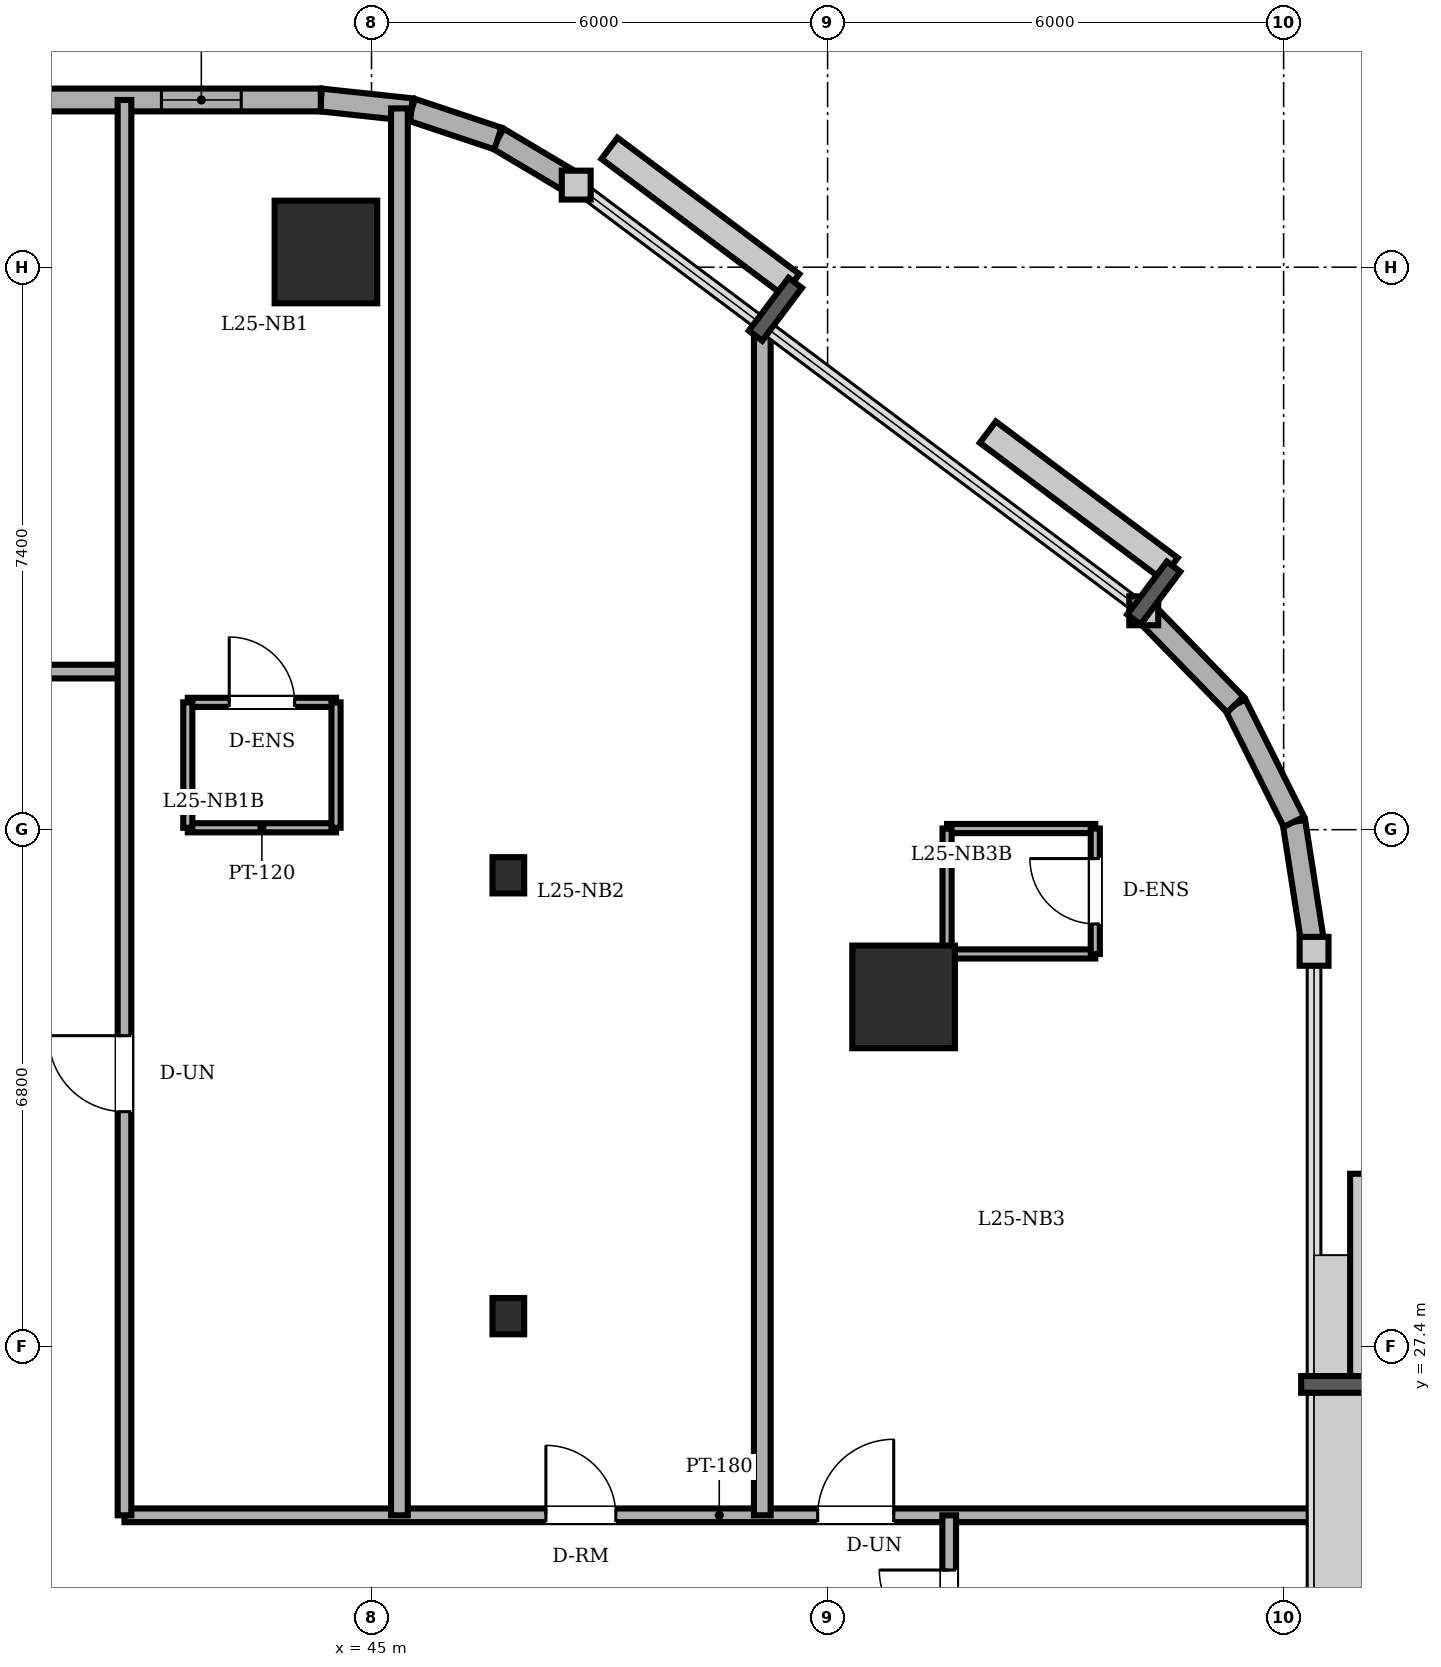
"""IFC4 building model, lengths in metres.
Left out: names, types, materials, properties, quantities, classifications, styles, units other than length and angle.
Written with IfcOpenShell. Run it as: python <this file> out.ifc"""

import sys

from ifc_helpers import new_model, si_unit, direction, frame, frame_2d, origin, origin_2d, place, context, subcontext, project, spatial, rectangle, circle, i_section, extrude, element, fill, save


model = new_model("IFC4")
c1 = context("Model", 3, precision=1e-05, world=origin(), true_north=direction((0.0, 1.0)))
c2 = subcontext(c1, "Body", "Model", "MODEL_VIEW")
j1 = project(units=[si_unit("LENGTHUNIT", "METRE"), si_unit("PLANEANGLEUNIT", "RADIAN")], contexts=[c1])
p1 = place(None, origin())
s1 = spatial("IfcSite", under=j1, at=p1, CompositionType="ELEMENT")
p2 = place(p1, origin())
s2 = spatial("IfcBuilding", under=s1, at=p2, CompositionType="ELEMENT")
p3 = place(p2, frame((0.0, 0.0, 97.1)))
s3 = spatial("IfcBuildingStorey", under=s2, at=p3, CompositionType="ELEMENT", Elevation=97.1)
for number, where, z_axis, x_axis in (
    (1, (52.0, 32.0, 0.0), (0.0, 0.0, 1.0), (1.0, 0.0, 0.0)),
    (2, (44.4, 41.8, 0.0), (0.0, 0.0, 1.0), (1.0, 0.0, 0.0)),
):
    element("IfcColumn", number, at=place(p3, frame(where, z_axis=z_axis, x_axis=x_axis)), inside=s3, PredefinedType="COLUMN", context=c2, shape_type="SweptSolid", body=[
        extrude(circle(Radius=0.675, at=origin_2d()), origin(), (0.0, 0.0, 1.0), 3.6),
    ])
for number, where, z_axis, x_axis in (
    (3, (46.8, 27.8, 0.0), (0.0, 0.0, 1.0), (1.0, 0.0, 0.0)),
    (4, (46.8, 33.6, 0.0), (0.0, 0.0, 1.0), (1.0, 0.0, 0.0)),
):
    element("IfcColumn", number, at=place(p3, frame(where, z_axis=z_axis, x_axis=x_axis)), inside=s3, PredefinedType="COLUMN", context=c2, shape_type="SweptSolid", body=[
        extrude(i_section(OverallWidth=0.417, OverallDepth=0.477, WebThickness=0.036, FlangeThickness=0.057, FilletRadius=0.015, at=origin_2d()), origin(), (0.0, 0.0, 1.0), 3.6),
    ])
p4 = place(p3, frame((57.4, 32.6, 0.0), z_axis=(0.0, 0.0, 1.0), x_axis=(-0.153620989032, 0.988129845581, 0.0)))
e5 = element("IfcWall", 5, at=p4, inside=s3, PredefinedType="SOLIDWALL", context=c2, shape_type="SweptSolid", body=[
    extrude(rectangle(XDim=1.724, YDim=0.3, at=frame_2d((0.862, 0.0))), origin(), (0.0, 0.0, 1.0), 3.4),
])
for number, where, z_axis, x_axis in (
    (6, (57.135, 34.304, 0.0), (0.0, 0.0, 1.0), (-0.447, 0.894, 0.0)),
    (7, (56.364, 35.846, 0.0), (0.0, 0.0, 1.0), (-0.698, 0.716, 0.0)),
):
    element("IfcWall", number, at=place(p3, frame(where, z_axis=z_axis, x_axis=x_axis)), inside=s3, PredefinedType="SOLIDWALL", context=c2, shape_type="SweptSolid", body=[
        extrude(rectangle(XDim=1.724, YDim=0.3, at=frame_2d((0.862, 0.0))), origin(), (0.0, 0.0, 1.0), 3.4),
    ])
p5 = place(p3, frame((47.693, 42.68, 0.0), z_axis=(0.0, 0.0, 1.0), x_axis=(-0.859320591642, 0.511437308749, 0.0)))
e8 = element("IfcWall", 8, at=p5, inside=s3, PredefinedType="SOLIDWALL", context=c2, shape_type="SweptSolid", body=[
    extrude(rectangle(XDim=1.199, YDim=0.3, at=frame_2d((0.599, 0.0))), origin(), (0.0, 0.0, 1.0), 3.4),
])
p6 = place(p3, frame((46.663, 43.293, 0.0), z_axis=(0.0, 0.0, 1.0), x_axis=(-0.948744332129, 0.316044604847, 0.0)))
e9 = element("IfcWall", 9, at=p6, inside=s3, PredefinedType="SOLIDWALL", context=c2, shape_type="SweptSolid", body=[
    extrude(rectangle(XDim=1.2, YDim=0.3, at=frame_2d((0.6, 0.0))), origin(), (0.0, 0.0, 1.0), 3.4),
])
p7 = place(p3, frame((45.525, 43.672, 0.0), z_axis=(0.0, 0.0, 1.0), x_axis=(-0.994289103787, 0.106720092254, 0.0)))
e10 = element("IfcWall", 10, at=p7, inside=s3, PredefinedType="SOLIDWALL", context=c2, shape_type="SweptSolid", body=[
    extrude(rectangle(XDim=1.199, YDim=0.3, at=frame_2d((0.599, 0.0))), origin(), (0.0, 0.0, 1.0), 3.4),
])
p8 = place(p3, frame((44.333, 43.8, 0.0), z_axis=(0.0, 0.0, 1.0), x_axis=(-1.0, 0.0, 0.0)))
e11 = element("IfcWall", 11, at=p8, inside=s3, PredefinedType="SOLIDWALL", context=c2, shape_type="SweptSolid", body=[
    extrude(rectangle(XDim=29.933, YDim=0.3, at=frame_2d((14.967, 0.0))), origin(), (0.0, 0.0, 1.0), 3.4),
])
p9 = place(p8, frame((18.883, 0.0, 0.0)))
e12 = element("IfcOpeningElement", 12, at=p9, cuts=e11, PredefinedType="OPENING", context=c2, shape_type="SweptSolid", body=[
    extrude(rectangle(XDim=0.95, YDim=2.2, at=frame_2d((0.475, 1.1))), frame((0.0, 0.16, 0.0), z_axis=(0.0, -1.0, 0.0), x_axis=(1.0, 0.0, 0.0)), (0.0, 0.0, 1.0), 0.32),
])
p10 = place(p8, frame((5.541, 0.0, 0.85)))
e13 = element("IfcOpeningElement", 13, at=p10, cuts=e11, PredefinedType="OPENING", context=c2, shape_type="SweptSolid", body=[
    extrude(rectangle(XDim=1.65, YDim=1.55, at=frame_2d((0.825, 0.775))), frame((0.0, 0.16, 0.0), z_axis=(0.0, -1.0, 0.0), x_axis=(1.0, 0.0, 0.0)), (0.0, 0.0, 1.0), 0.32),
])
p11 = place(p8, frame((9.325, 0.0, 0.85)))
e14 = element("IfcOpeningElement", 14, at=p11, cuts=e11, PredefinedType="OPENING", context=c2, shape_type="SweptSolid", body=[
    extrude(rectangle(XDim=1.65, YDim=1.55, at=frame_2d((0.825, 0.775))), frame((0.0, 0.16, 0.0), z_axis=(0.0, -1.0, 0.0), x_axis=(1.0, 0.0, 0.0)), (0.0, 0.0, 1.0), 0.32),
])
p12 = place(p8, frame((15.508, 0.0, 0.85)))
e15 = element("IfcOpeningElement", 15, at=p12, cuts=e11, PredefinedType="OPENING", context=c2, shape_type="SweptSolid", body=[
    extrude(rectangle(XDim=1.65, YDim=1.55, at=frame_2d((0.825, 0.775))), frame((0.0, 0.16, 0.0), z_axis=(0.0, -1.0, 0.0), x_axis=(1.0, 0.0, 0.0)), (0.0, 0.0, 1.0), 0.32),
])
p13 = place(p8, frame((23.125, 0.0, 0.85)))
e16 = element("IfcOpeningElement", 16, at=p13, cuts=e11, PredefinedType="OPENING", context=c2, shape_type="SweptSolid", body=[
    extrude(rectangle(XDim=1.65, YDim=1.55, at=frame_2d((0.825, 0.775))), frame((0.0, 0.16, 0.0), z_axis=(0.0, -1.0, 0.0), x_axis=(1.0, 0.0, 0.0)), (0.0, 0.0, 1.0), 0.32),
])
p14 = place(p8, frame((25.941, 0.0, 0.85)))
e17 = element("IfcOpeningElement", 17, at=p14, cuts=e11, PredefinedType="OPENING", context=c2, shape_type="SweptSolid", body=[
    extrude(rectangle(XDim=1.65, YDim=1.55, at=frame_2d((0.825, 0.775))), frame((0.0, 0.16, 0.0), z_axis=(0.0, -1.0, 0.0), x_axis=(1.0, 0.0, 0.0)), (0.0, 0.0, 1.0), 0.32),
])
p15 = place(p8, frame((1.047, 0.0, 0.85)))
e18 = element("IfcOpeningElement", 18, at=p15, cuts=e11, PredefinedType="OPENING", context=c2, shape_type="SweptSolid", body=[
    extrude(rectangle(XDim=1.05, YDim=1.55, at=frame_2d((0.525, 0.775))), frame((0.0, 0.16, 0.0), z_axis=(0.0, -1.0, 0.0), x_axis=(1.0, 0.0, 0.0)), (0.0, 0.0, 1.0), 0.32),
])
p16 = place(p3, frame((42.583, 35.875, 0.0), z_axis=(0.0, 0.0, 1.0), x_axis=(1.0, 0.0, 0.0)))
e19 = element("IfcWall", 19, at=p16, inside=s3, PredefinedType="PARTITIONING", context=c2, shape_type="SweptSolid", body=[
    extrude(rectangle(XDim=1.95, YDim=0.12, at=frame_2d((0.975, 0.0))), origin(), (0.0, 0.0, 1.0), 3.4),
])
p17 = place(p16, frame((0.545, 0.0, 0.0)))
e20 = element("IfcOpeningElement", 20, at=p17, cuts=e19, PredefinedType="OPENING", context=c2, shape_type="SweptSolid", body=[
    extrude(rectangle(XDim=0.86, YDim=2.1, at=frame_2d((0.43, 1.05))), frame((0.0, 0.07, 0.0), z_axis=(0.0, -1.0, 0.0), x_axis=(1.0, 0.0, 0.0)), (0.0, 0.0, 1.0), 0.14),
])
p18 = place(p3, frame((44.533, 34.225, 0.0), z_axis=(0.0, 0.0, 1.0), x_axis=(-1.0, 0.0, 0.0)))
e21 = element("IfcWall", 21, at=p18, inside=s3, PredefinedType="PARTITIONING", context=c2, shape_type="SweptSolid", body=[
    extrude(rectangle(XDim=1.95, YDim=0.12, at=frame_2d((0.975, 0.0))), origin(), (0.0, 0.0, 1.0), 3.4),
])
for number, where, z_axis, x_axis in (
    (22, (42.583, 35.875, 0.0), (0.0, 0.0, 1.0), (0.0, -1.0, 0.0)),
    (23, (44.533, 34.225, 0.0), (0.0, 0.0, 1.0), (0.0, 1.0, 0.0)),
):
    element("IfcWall", number, at=place(p3, frame(where, z_axis=z_axis, x_axis=x_axis)), inside=s3, PredefinedType="PARTITIONING", context=c2, shape_type="SweptSolid", body=[
        extrude(rectangle(XDim=1.65, YDim=0.12, at=frame_2d((0.825, 0.0))), origin(), (0.0, 0.0, 1.0), 3.4),
    ])
for number, where, z_axis, x_axis in (
    (24, (52.572, 34.215, 0.0), (0.0, 0.0, 1.0), (1.0, 0.0, 0.0)),
    (25, (54.522, 32.565, 0.0), (0.0, 0.0, 1.0), (-1.0, 0.0, 0.0)),
):
    element("IfcWall", number, at=place(p3, frame(where, z_axis=z_axis, x_axis=x_axis)), inside=s3, PredefinedType="PARTITIONING", context=c2, shape_type="SweptSolid", body=[
        extrude(rectangle(XDim=1.95, YDim=0.12, at=frame_2d((0.975, 0.0))), origin(), (0.0, 0.0, 1.0), 3.4),
    ])
p19 = place(p3, frame((52.572, 34.215, 0.0), z_axis=(0.0, 0.0, 1.0), x_axis=(0.0, -1.0, 0.0)))
e26 = element("IfcWall", 26, at=p19, inside=s3, PredefinedType="PARTITIONING", context=c2, shape_type="SweptSolid", body=[
    extrude(rectangle(XDim=1.65, YDim=0.12, at=frame_2d((0.825, 0.0))), origin(), (0.0, 0.0, 1.0), 3.4),
])
p20 = place(p3, frame((54.522, 32.565, 0.0), z_axis=(0.0, 0.0, 1.0), x_axis=(0.0, 1.0, 0.0)))
e27 = element("IfcWall", 27, at=p20, inside=s3, PredefinedType="PARTITIONING", context=c2, shape_type="SweptSolid", body=[
    extrude(rectangle(XDim=1.65, YDim=0.12, at=frame_2d((0.825, 0.0))), origin(), (0.0, 0.0, 1.0), 3.4),
])
p21 = place(p20, frame((0.395, 0.0, 0.0)))
e28 = element("IfcOpeningElement", 28, at=p21, cuts=e27, PredefinedType="OPENING", context=c2, shape_type="SweptSolid", body=[
    extrude(rectangle(XDim=0.86, YDim=2.1, at=frame_2d((0.43, 1.05))), frame((0.0, 0.07, 0.0), z_axis=(0.0, -1.0, 0.0), x_axis=(1.0, 0.0, 0.0)), (0.0, 0.0, 1.0), 0.14),
])
p22 = place(p3, frame((41.75, 25.18, 0.0), z_axis=(0.0, 0.0, 1.0), x_axis=(1.0, 0.0, 0.0)))
e29 = element("IfcWall", 29, at=p22, inside=s3, PredefinedType="PARTITIONING", context=c2, shape_type="SweptSolid", body=[
    extrude(rectangle(XDim=15.65, YDim=0.18, at=frame_2d((7.825, 0.0))), origin(), (0.0, 0.0, 1.0), 3.4),
])
p23 = place(p22, frame((5.544, 0.0, 0.0)))
e30 = element("IfcOpeningElement", 30, at=p23, cuts=e29, PredefinedType="OPENING", context=c2, shape_type="SweptSolid", body=[
    extrude(rectangle(XDim=0.92, YDim=2.1, at=frame_2d((0.46, 1.05))), frame((0.0, 0.1, 0.0), z_axis=(0.0, -1.0, 0.0), x_axis=(1.0, 0.0, 0.0)), (0.0, 0.0, 1.0), 0.2),
])
p24 = place(p22, frame((9.12, 0.0, 0.0)))
e31 = element("IfcOpeningElement", 31, at=p24, cuts=e29, PredefinedType="OPENING", context=c2, shape_type="SweptSolid", body=[
    extrude(rectangle(XDim=1.0, YDim=2.15, at=frame_2d((0.5, 1.075))), frame((0.0, 0.1, 0.0), z_axis=(0.0, -1.0, 0.0), x_axis=(1.0, 0.0, 0.0)), (0.0, 0.0, 1.0), 0.2),
])
p25 = place(p3, frame((8.8, 36.28, 0.0), z_axis=(0.0, 0.0, 1.0), x_axis=(1.0, 0.0, 0.0)))
e32 = element("IfcWall", 32, at=p25, inside=s3, PredefinedType="PARTITIONING", context=c2, shape_type="SweptSolid", body=[
    extrude(rectangle(XDim=32.95, YDim=0.18, at=frame_2d((16.475, 0.0))), origin(), (0.0, 0.0, 1.0), 3.4),
])
p26 = place(p25, frame((15.65, 0.0, 0.0)))
e33 = element("IfcOpeningElement", 33, at=p26, cuts=e32, PredefinedType="OPENING", context=c2, shape_type="SweptSolid", body=[
    extrude(rectangle(XDim=0.9, YDim=2.1, at=frame_2d((0.45, 1.05))), frame((0.0, 0.1, 0.0), z_axis=(0.0, -1.0, 0.0), x_axis=(1.0, 0.0, 0.0)), (0.0, 0.0, 1.0), 0.2),
])
p27 = place(p25, frame((19.27, 0.0, 0.0)))
e34 = element("IfcOpeningElement", 34, at=p27, cuts=e32, PredefinedType="OPENING", context=c2, shape_type="SweptSolid", body=[
    extrude(rectangle(XDim=0.86, YDim=2.1, at=frame_2d((0.43, 1.05))), frame((0.0, 0.1, 0.0), z_axis=(0.0, -1.0, 0.0), x_axis=(1.0, 0.0, 0.0)), (0.0, 0.0, 1.0), 0.2),
])
p28 = place(p25, frame((7.3, 0.0, 0.0)))
e35 = element("IfcOpeningElement", 35, at=p28, cuts=e32, PredefinedType="OPENING", context=c2, shape_type="SweptSolid", body=[
    extrude(rectangle(XDim=1.0, YDim=2.15, at=frame_2d((0.5, 1.075))), frame((0.0, 0.1, 0.0), z_axis=(0.0, -1.0, 0.0), x_axis=(1.0, 0.0, 0.0)), (0.0, 0.0, 1.0), 0.2),
])
p29 = place(p25, frame((26.555, 0.0, 0.0)))
e36 = element("IfcOpeningElement", 36, at=p29, cuts=e32, PredefinedType="OPENING", context=c2, shape_type="SweptSolid", body=[
    extrude(rectangle(XDim=0.92, YDim=2.1, at=frame_2d((0.46, 1.05))), frame((0.0, 0.1, 0.0), z_axis=(0.0, -1.0, 0.0), x_axis=(1.0, 0.0, 0.0)), (0.0, 0.0, 1.0), 0.2),
])
p30 = place(p3, frame((41.75, 25.18, 0.0), z_axis=(0.0, 0.0, 1.0), x_axis=(0.0, 1.0, 0.0)))
e37 = element("IfcWall", 37, at=p30, inside=s3, PredefinedType="PARTITIONING", context=c2, shape_type="SweptSolid", body=[
    extrude(rectangle(XDim=18.62, YDim=0.18, at=frame_2d((9.31, 0.0))), origin(), (0.0, 0.0, 1.0), 3.4),
])
p31 = place(p30, frame((5.31, 0.0, 0.0)))
e38 = element("IfcOpeningElement", 38, at=p31, cuts=e37, PredefinedType="OPENING", context=c2, shape_type="SweptSolid", body=[
    extrude(rectangle(XDim=1.0, YDim=2.15, at=frame_2d((0.5, 1.075))), frame((0.0, 0.1, 0.0), z_axis=(0.0, -1.0, 0.0), x_axis=(1.0, 0.0, 0.0)), (0.0, 0.0, 1.0), 0.2),
])
p32 = place(p3, frame((45.367, 25.18, 0.0), z_axis=(0.0, 0.0, 1.0), x_axis=(0.0, 1.0, 0.0)))
e39 = element("IfcWall", 39, at=p32, inside=s3, PredefinedType="PARTITIONING", context=c2, shape_type="SweptSolid", body=[
    extrude(rectangle(XDim=18.509, YDim=0.22, at=frame_2d((9.254, 0.0))), origin(), (0.0, 0.0, 1.0), 2.882),
])
p33 = place(p3, frame((50.141, 25.18, 0.0), z_axis=(0.0, 0.0, 1.0), x_axis=(0.0, 1.0, 0.0)))
e40 = element("IfcWall", 40, at=p33, inside=s3, PredefinedType="PARTITIONING", context=c2, shape_type="SweptSolid", body=[
    extrude(rectangle(XDim=15.664, YDim=0.22, at=frame_2d((7.832, 0.0))), origin(), (0.0, 0.0, 1.0), 3.4),
])
p34 = place(p3, frame((52.6, 22.82, 0.0), z_axis=(0.0, 0.0, 1.0), x_axis=(0.0, 1.0, 0.0)))
e41 = element("IfcWall", 41, at=p34, inside=s3, PredefinedType="PARTITIONING", context=c2, shape_type="SweptSolid", body=[
    extrude(rectangle(XDim=2.36, YDim=0.18, at=frame_2d((1.18, 0.0))), origin(), (0.0, 0.0, 1.0), 3.4),
])
p35 = place(p34, frame((0.72, 0.0, 0.0)))
e42 = element("IfcOpeningElement", 42, at=p35, cuts=e41, PredefinedType="OPENING", context=c2, shape_type="SweptSolid", body=[
    extrude(rectangle(XDim=0.92, YDim=2.1, at=frame_2d((0.46, 1.05))), frame((0.0, 0.1, 0.0), z_axis=(0.0, -1.0, 0.0), x_axis=(1.0, 0.0, 0.0)), (0.0, 0.0, 1.0), 0.2),
])
p36 = place(p15, origin())
e43 = element("IfcWindow", 43, at=p36, inside=s3, PartitioningType="SINGLE_PANEL", PredefinedType="WINDOW", context=c2, shape_type="SweptSolid", body=[
    extrude(rectangle(XDim=1.05, YDim=1.55, at=frame_2d((0.525, 0.775))), frame((0.0, 0.03, 0.0), z_axis=(0.0, -1.0, 0.0), x_axis=(1.0, 0.0, 0.0)), (0.0, 0.0, 1.0), 0.06),
])
fill(e18, e43)
p37 = place(p17, origin())
e44 = element("IfcDoor", 44, at=p37, inside=s3, OperationType="SINGLE_SWING_LEFT", PredefinedType="DOOR", context=c2, shape_type="SweptSolid", body=[
    extrude(rectangle(XDim=0.86, YDim=2.1, at=frame_2d((0.43, 1.05))), frame((0.0, 0.025, 0.0), z_axis=(0.0, -1.0, 0.0), x_axis=(1.0, 0.0, 0.0)), (0.0, 0.0, 1.0), 0.05),
])
fill(e20, e44)
p38 = place(p21, origin())
e45 = element("IfcDoor", 45, at=p38, inside=s3, OperationType="SINGLE_SWING_RIGHT", PredefinedType="DOOR", context=c2, shape_type="SweptSolid", body=[
    extrude(rectangle(XDim=0.86, YDim=2.1, at=frame_2d((0.43, 1.05))), frame((0.0, 0.025, 0.0), z_axis=(0.0, -1.0, 0.0), x_axis=(1.0, 0.0, 0.0)), (0.0, 0.0, 1.0), 0.05),
])
fill(e28, e45)
p39 = place(p31, origin())
e46 = element("IfcDoor", 46, at=p39, inside=s3, OperationType="SINGLE_SWING_RIGHT", PredefinedType="DOOR", context=c2, shape_type="SweptSolid", body=[
    extrude(rectangle(XDim=1.0, YDim=2.15, at=frame_2d((0.5, 1.075))), frame((0.0, 0.025, 0.0), z_axis=(0.0, -1.0, 0.0), x_axis=(1.0, 0.0, 0.0)), (0.0, 0.0, 1.0), 0.05),
])
fill(e38, e46)
p40 = place(p23, origin())
e47 = element("IfcDoor", 47, at=p40, inside=s3, OperationType="SINGLE_SWING_LEFT", PredefinedType="DOOR", context=c2, shape_type="SweptSolid", body=[
    extrude(rectangle(XDim=0.92, YDim=2.1, at=frame_2d((0.46, 1.05))), frame((0.0, 0.025, 0.0), z_axis=(0.0, -1.0, 0.0), x_axis=(1.0, 0.0, 0.0)), (0.0, 0.0, 1.0), 0.05),
])
fill(e30, e47)
p41 = place(p24, origin())
e48 = element("IfcDoor", 48, at=p41, inside=s3, OperationType="SINGLE_SWING_RIGHT", PredefinedType="DOOR", context=c2, shape_type="SweptSolid", body=[
    extrude(rectangle(XDim=1.0, YDim=2.15, at=frame_2d((0.5, 1.075))), frame((0.0, 0.025, 0.0), z_axis=(0.0, -1.0, 0.0), x_axis=(1.0, 0.0, 0.0)), (0.0, 0.0, 1.0), 0.05),
])
fill(e31, e48)
p42 = place(p35, origin())
e49 = element("IfcDoor", 49, at=p42, inside=s3, OperationType="SINGLE_SWING_RIGHT", PredefinedType="DOOR", context=c2, shape_type="SweptSolid", body=[
    extrude(rectangle(XDim=0.92, YDim=2.1, at=frame_2d((0.46, 1.05))), frame((0.0, 0.025, 0.0), z_axis=(0.0, -1.0, 0.0), x_axis=(1.0, 0.0, 0.0)), (0.0, 0.0, 1.0), 0.05),
])
fill(e42, e49)
save(model, sys.argv[1])
